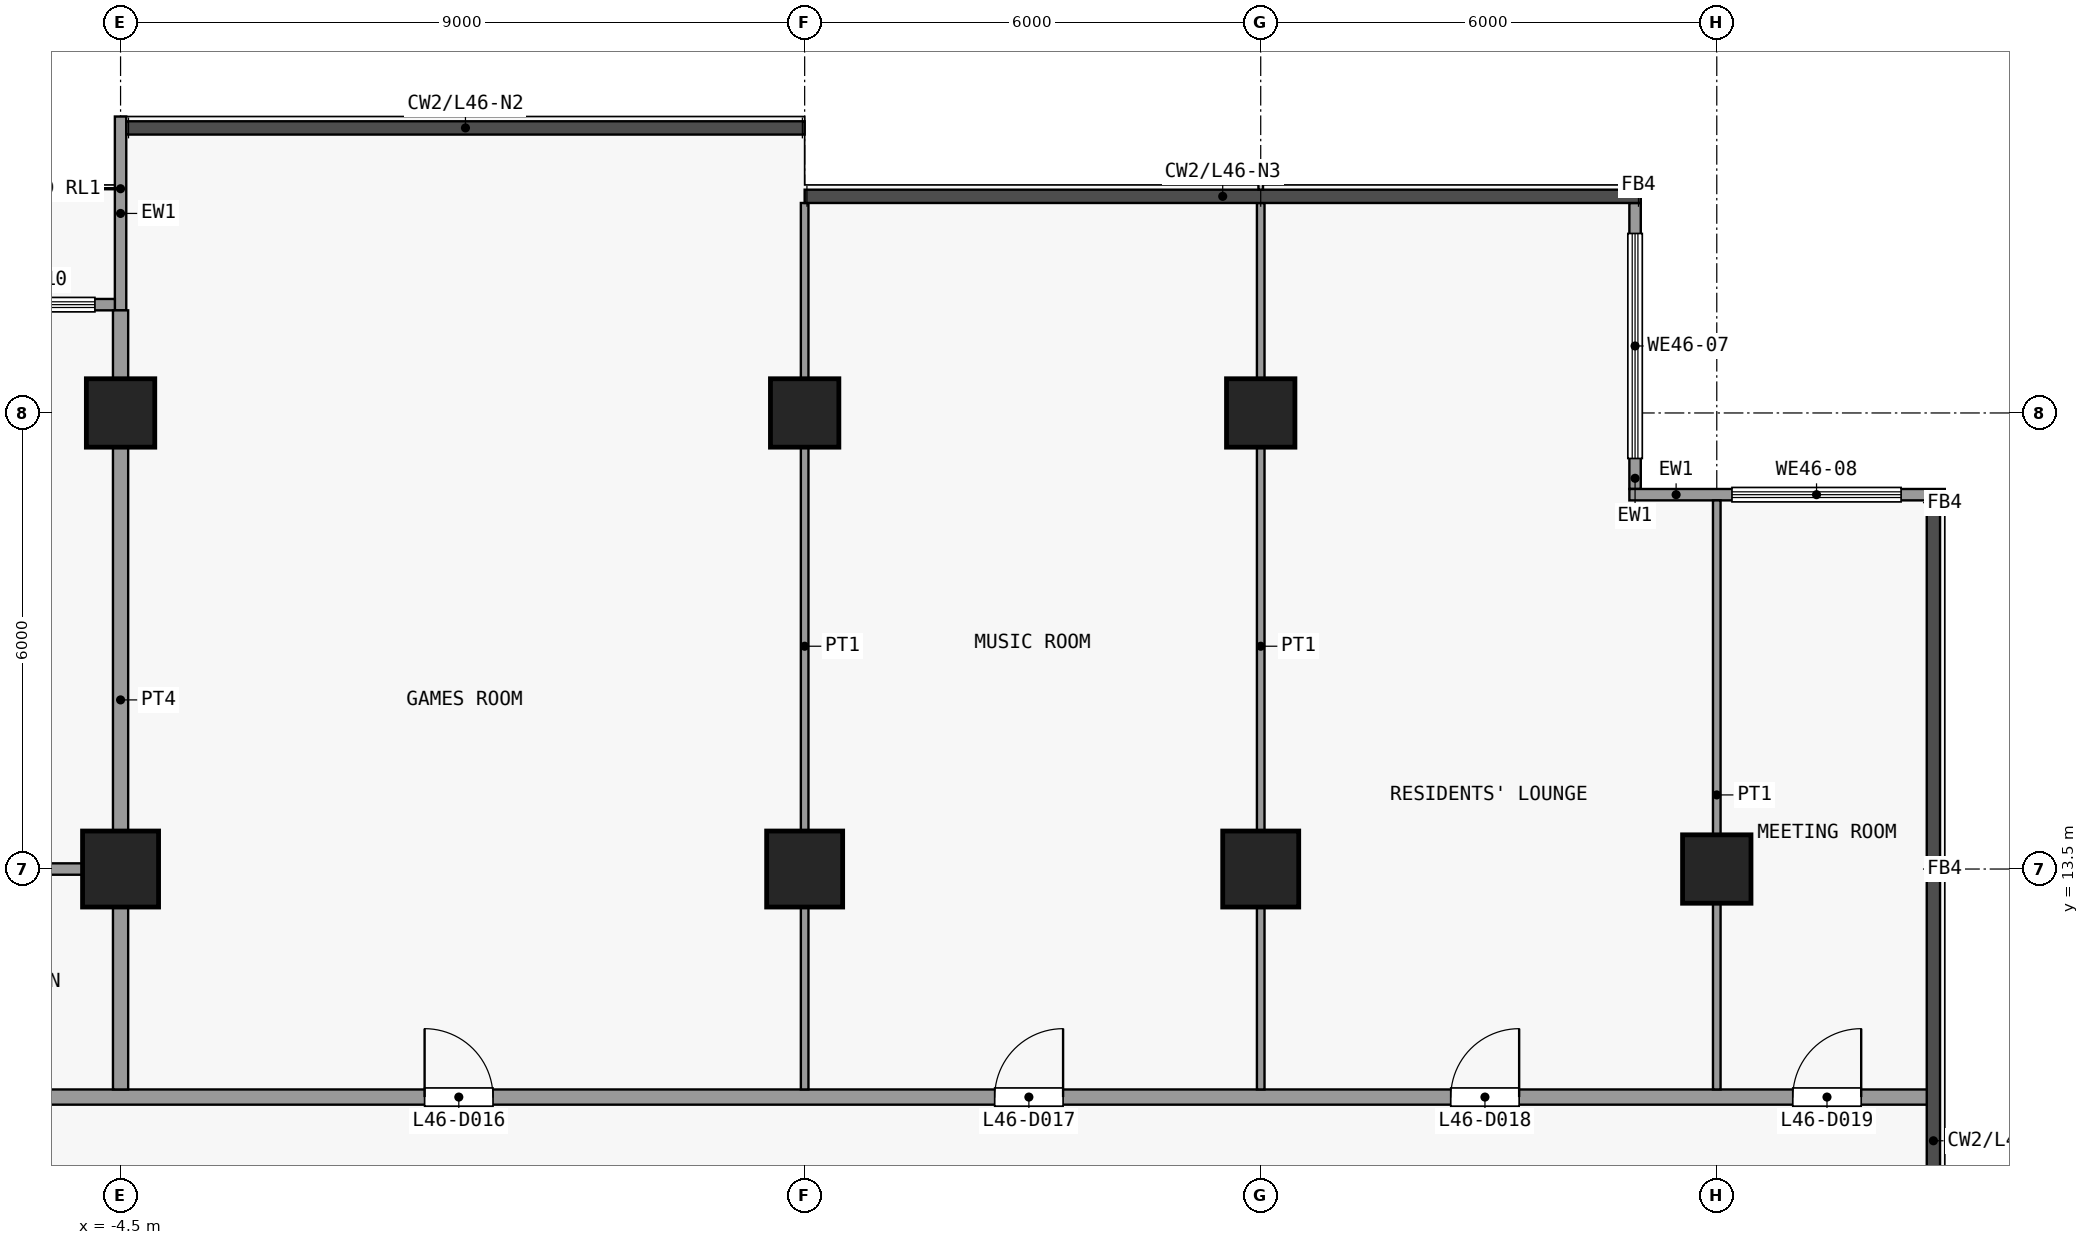
"""IFC4 building model, lengths in metres.
Left out: names, types, materials, properties, quantities, classifications, styles, units other than length and angle.
Written with IfcOpenShell. Run it as: python <this file> out.ifc"""

import sys

from ifc_helpers import new_model, si_unit, direction, frame, frame_2d, origin, origin_2d, place, context, subcontext, project, spatial, rectangle, extrude, element, fill, save


model = new_model("IFC4")
c1 = context("Model", 3, precision=1e-05, world=origin(), true_north=direction((0.0, 1.0)))
c2 = subcontext(c1, "Body", "Model", "MODEL_VIEW")
j1 = project(units=[si_unit("LENGTHUNIT", "METRE"), si_unit("PLANEANGLEUNIT", "RADIAN")], contexts=[c1])
p1 = place(None, origin())
s1 = spatial("IfcSite", under=j1, at=p1, CompositionType="ELEMENT")
p2 = place(p1, origin())
s2 = spatial("IfcBuilding", under=s1, at=p2, CompositionType="ELEMENT")
p3 = place(p2, frame((0.0, 0.0, 185.3)))
s3 = spatial("IfcBuildingStorey", under=s2, at=p3, CompositionType="ELEMENT", Elevation=185.3)
p4 = place(p3, frame((-4.5, 13.5, 0.0), z_axis=(0.0, 0.0, 1.0), x_axis=(1.0, 0.0, 0.0)))
e1 = element("IfcColumn", 1, at=p4, inside=s3, PredefinedType="COLUMN", context=c2, shape_type="SweptSolid", body=[
    extrude(rectangle(XDim=1.0, YDim=1.0, at=origin_2d()), origin(), (0.0, 0.0, 1.0), 3.6),
])
p5 = place(p3, frame((-4.5, 19.5, 0.0), z_axis=(0.0, 0.0, 1.0), x_axis=(1.0, 0.0, 0.0)))
e2 = element("IfcColumn", 2, at=p5, inside=s3, PredefinedType="COLUMN", context=c2, shape_type="SweptSolid", body=[
    extrude(rectangle(XDim=0.9, YDim=0.9, at=origin_2d()), origin(), (0.0, 0.0, 1.0), 3.6),
])
p6 = place(p3, frame((4.5, 13.5, 0.0), z_axis=(0.0, 0.0, 1.0), x_axis=(1.0, 0.0, 0.0)))
e3 = element("IfcColumn", 3, at=p6, inside=s3, PredefinedType="COLUMN", context=c2, shape_type="SweptSolid", body=[
    extrude(rectangle(XDim=1.0, YDim=1.0, at=origin_2d()), origin(), (0.0, 0.0, 1.0), 3.6),
])
p7 = place(p3, frame((4.5, 19.5, 0.0), z_axis=(0.0, 0.0, 1.0), x_axis=(1.0, 0.0, 0.0)))
e4 = element("IfcColumn", 4, at=p7, inside=s3, PredefinedType="COLUMN", context=c2, shape_type="SweptSolid", body=[
    extrude(rectangle(XDim=0.9, YDim=0.9, at=origin_2d()), origin(), (0.0, 0.0, 1.0), 3.6),
])
p8 = place(p3, frame((10.5, 13.5, 0.0), z_axis=(0.0, 0.0, 1.0), x_axis=(1.0, 0.0, 0.0)))
e5 = element("IfcColumn", 5, at=p8, inside=s3, PredefinedType="COLUMN", context=c2, shape_type="SweptSolid", body=[
    extrude(rectangle(XDim=1.0, YDim=1.0, at=origin_2d()), origin(), (0.0, 0.0, 1.0), 3.6),
])
for number, where, z_axis, x_axis in (
    (6, (10.5, 19.5, 0.0), (0.0, 0.0, 1.0), (1.0, 0.0, 0.0)),
    (7, (16.5, 13.5, 0.0), (0.0, 0.0, 1.0), (1.0, 0.0, 0.0)),
):
    element("IfcColumn", number, at=place(p3, frame(where, z_axis=z_axis, x_axis=x_axis)), inside=s3, PredefinedType="COLUMN", context=c2, shape_type="SweptSolid", body=[
        extrude(rectangle(XDim=0.9, YDim=0.9, at=origin_2d()), origin(), (0.0, 0.0, 1.0), 3.6),
    ])
p9 = place(p3, frame((15.425, 22.262, 0.0), z_axis=(0.0, 0.0, 1.0), x_axis=(0.0, -1.0, 0.0)))
e8 = element("IfcWall", 8, at=p9, inside=s3, PredefinedType="SOLIDWALL", context=c2, shape_type="SweptSolid", body=[
    extrude(rectangle(XDim=3.762, YDim=0.15, at=frame_2d((1.881, 0.0))), origin(), (0.0, 0.0, 1.0), 3.3),
])
p10 = place(p9, frame((0.401, 0.0, 0.9)))
e9 = element("IfcOpeningElement", 9, at=p10, cuts=e8, PredefinedType="OPENING", context=c2, shape_type="SweptSolid", body=[
    extrude(rectangle(XDim=2.96, YDim=2.4, at=frame_2d((1.48, 1.2))), frame((0.0, 0.085, 0.0), z_axis=(0.0, -1.0, 0.0), x_axis=(1.0, 0.0, 0.0)), (0.0, 0.0, 1.0), 0.17),
])
p11 = place(p3, frame((15.35, 18.425, 0.0), z_axis=(0.0, 0.0, 1.0), x_axis=(1.0, 0.0, 0.0)))
e10 = element("IfcWall", 10, at=p11, inside=s3, PredefinedType="SOLIDWALL", context=c2, shape_type="SweptSolid", body=[
    extrude(rectangle(XDim=4.15, YDim=0.15, at=frame_2d((2.075, 0.0))), origin(), (0.0, 0.0, 1.0), 3.3),
])
p12 = place(p11, frame((1.35, 0.0, 0.9)))
e11 = element("IfcOpeningElement", 11, at=p12, cuts=e10, PredefinedType="OPENING", context=c2, shape_type="SweptSolid", body=[
    extrude(rectangle(XDim=2.225, YDim=2.4, at=frame_2d((1.113, 1.2))), frame((0.0, 0.085, 0.0), z_axis=(0.0, -1.0, 0.0), x_axis=(1.0, 0.0, 0.0)), (0.0, 0.0, 1.0), 0.17),
])
p13 = place(p3, frame((-4.5, 20.85, 0.0), z_axis=(0.0, 0.0, 1.0), x_axis=(0.0, 1.0, 0.0)))
e12 = element("IfcWall", 12, at=p13, inside=s3, PredefinedType="SOLIDWALL", context=c2, shape_type="SweptSolid", body=[
    extrude(rectangle(XDim=2.55, YDim=0.15, at=frame_2d((1.275, 0.0))), origin(), (0.0, 0.0, 1.0), 3.3),
])
p14 = place(p3, frame((-10.425, 20.925, 0.0), z_axis=(0.0, 0.0, 1.0), x_axis=(1.0, 0.0, 0.0)))
e13 = element("IfcWall", 13, at=p14, inside=s3, PredefinedType="SOLIDWALL", context=c2, shape_type="SweptSolid", body=[
    extrude(rectangle(XDim=5.85, YDim=0.15, at=frame_2d((2.925, 0.0))), origin(), (0.0, 0.0, 1.0), 3.3),
])
p15 = place(p14, frame((2.325, 0.0, 0.0)))
e14 = element("IfcOpeningElement", 14, at=p15, cuts=e13, PredefinedType="OPENING", context=c2, shape_type="SweptSolid", body=[
    extrude(rectangle(XDim=1.2, YDim=2.4, at=frame_2d((0.6, 1.2))), frame((0.0, 0.085, 0.0), z_axis=(0.0, -1.0, 0.0), x_axis=(1.0, 0.0, 0.0)), (0.0, 0.0, 1.0), 0.17),
])
p16 = place(p14, frame((0.262, 0.0, 0.9)))
e15 = element("IfcOpeningElement", 15, at=p16, cuts=e13, PredefinedType="OPENING", context=c2, shape_type="SweptSolid", body=[
    extrude(rectangle(XDim=1.8, YDim=2.1, at=frame_2d((0.9, 1.05))), frame((0.0, 0.085, 0.0), z_axis=(0.0, -1.0, 0.0), x_axis=(1.0, 0.0, 0.0)), (0.0, 0.0, 1.0), 0.17),
])
p17 = place(p14, frame((3.788, 0.0, 0.9)))
e16 = element("IfcOpeningElement", 16, at=p17, cuts=e13, PredefinedType="OPENING", context=c2, shape_type="SweptSolid", body=[
    extrude(rectangle(XDim=1.8, YDim=2.1, at=frame_2d((0.9, 1.05))), frame((0.0, 0.085, 0.0), z_axis=(0.0, -1.0, 0.0), x_axis=(1.0, 0.0, 0.0)), (0.0, 0.0, 1.0), 0.17),
])
p18 = place(p3, frame((-17.85, 10.5, 0.0), z_axis=(0.0, 0.0, 1.0), x_axis=(1.0, 0.0, 0.0)))
e17 = element("IfcWall", 17, at=p18, inside=s3, PredefinedType="PARTITIONING", context=c2, shape_type="SweptSolid", body=[
    extrude(rectangle(XDim=37.2, YDim=0.2, at=frame_2d((18.6, 0.0))), origin(), (0.0, 0.0, 1.0), 3.3),
])
p19 = place(p18, frame((9.05, 0.0, 0.0)))
e18 = element("IfcOpeningElement", 18, at=p19, cuts=e17, PredefinedType="OPENING", context=c2, shape_type="SweptSolid", body=[
    extrude(rectangle(XDim=1.0, YDim=2.1, at=frame_2d((0.5, 1.05))), frame((0.0, 0.11, 0.0), z_axis=(0.0, -1.0, 0.0), x_axis=(1.0, 0.0, 0.0)), (0.0, 0.0, 1.0), 0.22),
])
p20 = place(p18, frame((17.35, 0.0, 0.0)))
e19 = element("IfcOpeningElement", 19, at=p20, cuts=e17, PredefinedType="OPENING", context=c2, shape_type="SweptSolid", body=[
    extrude(rectangle(XDim=0.9, YDim=2.1, at=frame_2d((0.45, 1.05))), frame((0.0, 0.11, 0.0), z_axis=(0.0, -1.0, 0.0), x_axis=(1.0, 0.0, 0.0)), (0.0, 0.0, 1.0), 0.22),
])
p21 = place(p18, frame((24.85, 0.0, 0.0)))
e20 = element("IfcOpeningElement", 20, at=p21, cuts=e17, PredefinedType="OPENING", context=c2, shape_type="SweptSolid", body=[
    extrude(rectangle(XDim=0.9, YDim=2.1, at=frame_2d((0.45, 1.05))), frame((0.0, 0.11, 0.0), z_axis=(0.0, -1.0, 0.0), x_axis=(1.0, 0.0, 0.0)), (0.0, 0.0, 1.0), 0.22),
])
p22 = place(p18, frame((30.85, 0.0, 0.0)))
e21 = element("IfcOpeningElement", 21, at=p22, cuts=e17, PredefinedType="OPENING", context=c2, shape_type="SweptSolid", body=[
    extrude(rectangle(XDim=0.9, YDim=2.1, at=frame_2d((0.45, 1.05))), frame((0.0, 0.11, 0.0), z_axis=(0.0, -1.0, 0.0), x_axis=(1.0, 0.0, 0.0)), (0.0, 0.0, 1.0), 0.22),
])
p23 = place(p18, frame((35.35, 0.0, 0.0)))
e22 = element("IfcOpeningElement", 22, at=p23, cuts=e17, PredefinedType="OPENING", context=c2, shape_type="SweptSolid", body=[
    extrude(rectangle(XDim=0.9, YDim=2.1, at=frame_2d((0.45, 1.05))), frame((0.0, 0.11, 0.0), z_axis=(0.0, -1.0, 0.0), x_axis=(1.0, 0.0, 0.0)), (0.0, 0.0, 1.0), 0.22),
])
p24 = place(p3, frame((-7.1, 13.5, 0.0), z_axis=(0.0, 0.0, 1.0), x_axis=(1.0, 0.0, 0.0)))
e23 = element("IfcWall", 23, at=p24, inside=s3, PredefinedType="PARTITIONING", context=c2, shape_type="SweptSolid", body=[
    extrude(rectangle(XDim=2.5, YDim=0.15, at=frame_2d((1.25, 0.0))), origin(), (0.0, 0.0, 1.0), 3.3),
])
p25 = place(p3, frame((-4.5, 10.6, 0.0), z_axis=(0.0, 0.0, 1.0), x_axis=(0.0, 1.0, 0.0)))
e24 = element("IfcWall", 24, at=p25, inside=s3, PredefinedType="PARTITIONING", context=c2, shape_type="SweptSolid", body=[
    extrude(rectangle(XDim=10.25, YDim=0.2, at=frame_2d((5.125, 0.0))), origin(), (0.0, 0.0, 1.0), 3.3),
])
for number, where, z_axis, x_axis in (
    (25, (4.5, 10.6, 0.0), (0.0, 0.0, 1.0), (0.0, 1.0, 0.0)),
    (26, (10.5, 10.6, 0.0), (0.0, 0.0, 1.0), (0.0, 1.0, 0.0)),
):
    element("IfcWall", number, at=place(p3, frame(where, z_axis=z_axis, x_axis=x_axis)), inside=s3, PredefinedType="PARTITIONING", context=c2, shape_type="SweptSolid", body=[
        extrude(rectangle(XDim=11.662, YDim=0.1, at=frame_2d((5.831, 0.0))), origin(), (0.0, 0.0, 1.0), 3.3),
    ])
p26 = place(p3, frame((16.5, 10.6, 0.0), z_axis=(0.0, 0.0, 1.0), x_axis=(0.0, 1.0, 0.0)))
e27 = element("IfcWall", 27, at=p26, inside=s3, PredefinedType="PARTITIONING", context=c2, shape_type="SweptSolid", body=[
    extrude(rectangle(XDim=7.75, YDim=0.1, at=frame_2d((3.875, 0.0))), origin(), (0.0, 0.0, 1.0), 3.3),
])
p27 = place(p10, origin())
e28 = element("IfcWindow", 28, at=p27, inside=s3, PartitioningType="SINGLE_PANEL", PredefinedType="WINDOW", context=c2, shape_type="SweptSolid", body=[
    extrude(rectangle(XDim=2.96, YDim=2.4, at=frame_2d((1.48, 1.2))), frame((0.0, 0.03, 0.0), z_axis=(0.0, -1.0, 0.0), x_axis=(1.0, 0.0, 0.0)), (0.0, 0.0, 1.0), 0.06),
])
fill(e9, e28)
p28 = place(p12, origin())
e29 = element("IfcWindow", 29, at=p28, inside=s3, PartitioningType="SINGLE_PANEL", PredefinedType="WINDOW", context=c2, shape_type="SweptSolid", body=[
    extrude(rectangle(XDim=2.225, YDim=2.4, at=frame_2d((1.113, 1.2))), frame((0.0, 0.03, 0.0), z_axis=(0.0, -1.0, 0.0), x_axis=(1.0, 0.0, 0.0)), (0.0, 0.0, 1.0), 0.06),
])
fill(e11, e29)
p29 = place(p17, origin())
e30 = element("IfcWindow", 30, at=p29, inside=s3, PartitioningType="SINGLE_PANEL", PredefinedType="WINDOW", context=c2, shape_type="SweptSolid", body=[
    extrude(rectangle(XDim=1.8, YDim=2.1, at=frame_2d((0.9, 1.05))), frame((0.0, 0.03, 0.0), z_axis=(0.0, -1.0, 0.0), x_axis=(1.0, 0.0, 0.0)), (0.0, 0.0, 1.0), 0.06),
])
fill(e16, e30)
p30 = place(p20, origin())
e31 = element("IfcDoor", 31, at=p30, inside=s3, OperationType="SINGLE_SWING_RIGHT", PredefinedType="DOOR", context=c2, shape_type="SweptSolid", body=[
    extrude(rectangle(XDim=0.9, YDim=2.1, at=frame_2d((0.45, 1.05))), frame((0.0, 0.025, 0.0), z_axis=(0.0, -1.0, 0.0), x_axis=(1.0, 0.0, 0.0)), (0.0, 0.0, 1.0), 0.05),
])
fill(e19, e31)
p31 = place(p21, origin())
e32 = element("IfcDoor", 32, at=p31, inside=s3, OperationType="SINGLE_SWING_LEFT", PredefinedType="DOOR", context=c2, shape_type="SweptSolid", body=[
    extrude(rectangle(XDim=0.9, YDim=2.1, at=frame_2d((0.45, 1.05))), frame((0.0, 0.025, 0.0), z_axis=(0.0, -1.0, 0.0), x_axis=(1.0, 0.0, 0.0)), (0.0, 0.0, 1.0), 0.05),
])
fill(e20, e32)
p32 = place(p22, origin())
e33 = element("IfcDoor", 33, at=p32, inside=s3, OperationType="SINGLE_SWING_LEFT", PredefinedType="DOOR", context=c2, shape_type="SweptSolid", body=[
    extrude(rectangle(XDim=0.9, YDim=2.1, at=frame_2d((0.45, 1.05))), frame((0.0, 0.025, 0.0), z_axis=(0.0, -1.0, 0.0), x_axis=(1.0, 0.0, 0.0)), (0.0, 0.0, 1.0), 0.05),
])
fill(e21, e33)
p33 = place(p23, origin())
e34 = element("IfcDoor", 34, at=p33, inside=s3, OperationType="SINGLE_SWING_LEFT", PredefinedType="DOOR", context=c2, shape_type="SweptSolid", body=[
    extrude(rectangle(XDim=0.9, YDim=2.1, at=frame_2d((0.45, 1.05))), frame((0.0, 0.025, 0.0), z_axis=(0.0, -1.0, 0.0), x_axis=(1.0, 0.0, 0.0)), (0.0, 0.0, 1.0), 0.05),
])
fill(e22, e34)
save(model, sys.argv[1])
